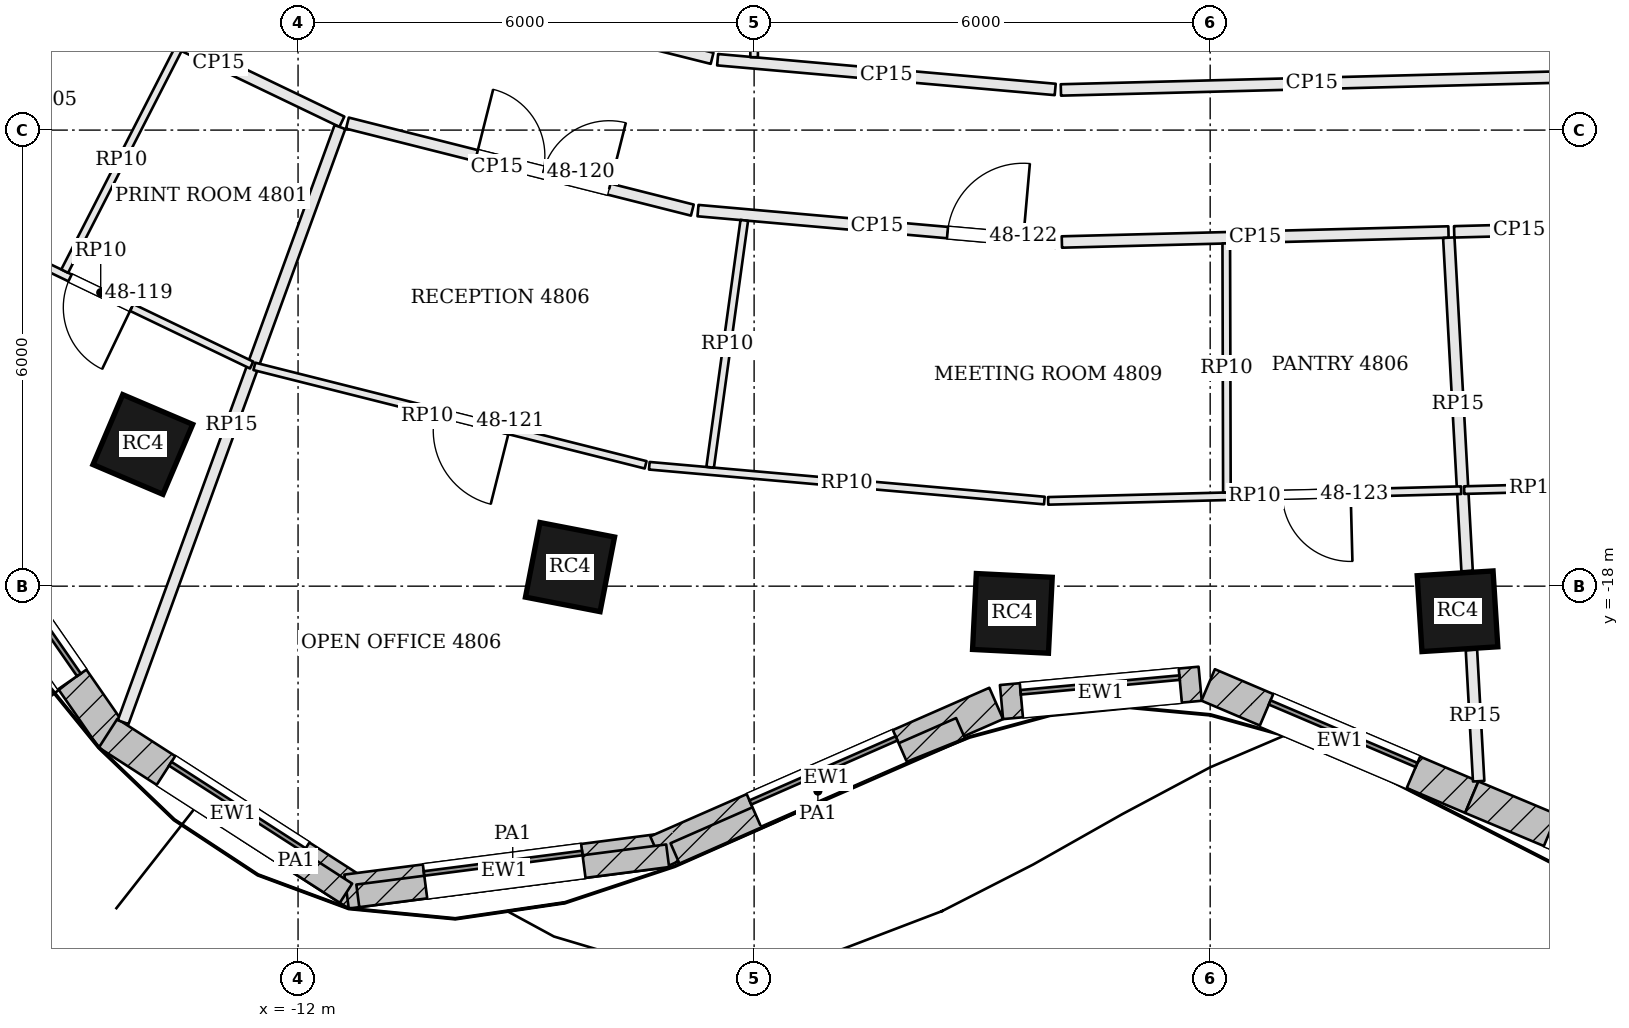
"""IFC4 building model, lengths in metres.
Left out: names, types, materials, properties, quantities, classifications, styles, units other than length and angle.
Written with IfcOpenShell. Run it as: python <this file> out.ifc"""

import sys

from ifc_helpers import new_model, si_unit, direction, frame, frame_2d, origin, origin_2d, place, context, subcontext, project, spatial, rectangle, extrude, element, fill, save


model = new_model("IFC4")
c1 = context("Model", 3, precision=1e-05, world=origin(), true_north=direction((0.0, 1.0)))
c2 = subcontext(c1, "Body", "Model", "MODEL_VIEW")
j1 = project(units=[si_unit("LENGTHUNIT", "METRE"), si_unit("PLANEANGLEUNIT", "RADIAN")], contexts=[c1])
p1 = place(None, origin())
s1 = spatial("IfcSite", under=j1, at=p1, CompositionType="ELEMENT")
p2 = place(p1, origin())
s2 = spatial("IfcBuilding", under=s1, at=p2, CompositionType="ELEMENT")
p3 = place(p2, frame((0.0, 0.0, 197.4)))
s3 = spatial("IfcBuildingStorey", under=s2, at=p3, CompositionType="ELEMENT", Elevation=197.4)
for number, where, z_axis, x_axis in (
    (1, (-14.042, -16.136, 0.0), (0.0, 0.0, 1.0), (0.92, -0.392, 0.0)),
    (2, (-8.422, -17.749, 0.0), (0.0, 0.0, 1.0), (0.982, -0.191, 0.0)),
    (3, (-2.602, -18.358, 0.0), (0.0, 0.0, 1.0), (0.999, -0.05, 0.0)),
    (4, (3.254, -18.33, 0.0), (0.0, 0.0, 1.0), (0.998, 0.063, 0.0)),
):
    element("IfcColumn", number, at=place(p3, frame(where, z_axis=z_axis, x_axis=x_axis)), inside=s3, PredefinedType="COLUMN", context=c2, shape_type="SweptSolid", body=[
        extrude(rectangle(XDim=1.0, YDim=1.0, at=origin_2d()), origin(), (0.0, 0.0, 1.0), 3.9),
    ])
p4 = place(p3, frame((-16.695, -16.737, 0.0), z_axis=(0.0, 0.0, 1.0), x_axis=(0.569652445465, -0.821885692402, 0.0)))
e5 = element("IfcWall", 5, at=p4, inside=s3, PredefinedType="SOLIDWALL", context=c2, shape_type="SweptSolid", body=[
    extrude(rectangle(XDim=3.959, YDim=0.45, at=frame_2d((1.979, 0.0))), origin(), (0.0, 0.0, 1.0), 3.7),
])
p5 = place(p4, frame((0.929, 0.0, 0.9)))
e6 = element("IfcOpeningElement", 6, at=p5, cuts=e5, PredefinedType="OPENING", context=c2, shape_type="SweptSolid", body=[
    extrude(rectangle(XDim=2.1, YDim=2.3, at=frame_2d((1.05, 1.15))), frame((0.0, 0.235, 0.0), z_axis=(0.0, -1.0, 0.0), x_axis=(1.0, 0.0, 0.0)), (0.0, 0.0, 1.0), 0.47),
])
p6 = place(p3, frame((-14.499, -19.935, 0.0), z_axis=(0.0, 0.0, 1.0), x_axis=(0.84080910763, -0.541331732422, 0.0)))
e7 = element("IfcWall", 7, at=p6, inside=s3, PredefinedType="SOLIDWALL", context=c2, shape_type="SweptSolid", body=[
    extrude(rectangle(XDim=3.911, YDim=0.45, at=frame_2d((1.955, 0.0))), origin(), (0.0, 0.0, 1.0), 3.7),
])
p7 = place(p6, frame((0.905, 0.0, 0.9)))
e8 = element("IfcOpeningElement", 8, at=p7, cuts=e7, PredefinedType="OPENING", context=c2, shape_type="SweptSolid", body=[
    extrude(rectangle(XDim=2.1, YDim=2.3, at=frame_2d((1.05, 1.15))), frame((0.0, 0.235, 0.0), z_axis=(0.0, -1.0, 0.0), x_axis=(1.0, 0.0, 0.0)), (0.0, 0.0, 1.0), 0.47),
])
p8 = place(p3, frame((-11.362, -22.018, 0.0), z_axis=(0.0, 0.0, 1.0), x_axis=(0.991724958022, 0.128380713645, 0.0)))
e9 = element("IfcWall", 9, at=p8, inside=s3, PredefinedType="SOLIDWALL", context=c2, shape_type="SweptSolid", body=[
    extrude(rectangle(XDim=4.182, YDim=0.45, at=frame_2d((2.091, 0.0))), origin(), (0.0, 0.0, 1.0), 3.7),
])
p9 = place(p8, frame((1.041, 0.0, 0.9)))
e10 = element("IfcOpeningElement", 10, at=p9, cuts=e9, PredefinedType="OPENING", context=c2, shape_type="SweptSolid", body=[
    extrude(rectangle(XDim=2.1, YDim=2.3, at=frame_2d((1.05, 1.15))), frame((0.0, 0.235, 0.0), z_axis=(0.0, -1.0, 0.0), x_axis=(1.0, 0.0, 0.0)), (0.0, 0.0, 1.0), 0.47),
])
p10 = place(p3, frame((-7.276, -21.498, 0.0), z_axis=(0.0, 0.0, 1.0), x_axis=(0.915872941312, 0.401468249519, 0.0)))
e11 = element("IfcWall", 11, at=p10, inside=s3, PredefinedType="SOLIDWALL", context=c2, shape_type="SweptSolid", body=[
    extrude(rectangle(XDim=4.87, YDim=0.45, at=frame_2d((2.435, 0.0))), origin(), (0.0, 0.0, 1.0), 3.7),
])
p11 = place(p10, frame((1.385, 0.0, 0.9)))
e12 = element("IfcOpeningElement", 12, at=p11, cuts=e11, PredefinedType="OPENING", context=c2, shape_type="SweptSolid", body=[
    extrude(rectangle(XDim=2.1, YDim=2.3, at=frame_2d((1.05, 1.15))), frame((0.0, 0.235, 0.0), z_axis=(0.0, -1.0, 0.0), x_axis=(1.0, 0.0, 0.0)), (0.0, 0.0, 1.0), 0.47),
])
p12 = place(p3, frame((-2.745, -19.525, 0.0), z_axis=(0.0, 0.0, 1.0), x_axis=(0.995768774275, 0.091894222771, 0.0)))
e13 = element("IfcWall", 13, at=p12, inside=s3, PredefinedType="SOLIDWALL", context=c2, shape_type="SweptSolid", body=[
    extrude(rectangle(XDim=2.625, YDim=0.45, at=frame_2d((1.312, 0.0))), origin(), (0.0, 0.0, 1.0), 3.7),
])
p13 = place(p12, frame((0.262, 0.0, 0.9)))
e14 = element("IfcOpeningElement", 14, at=p13, cuts=e13, PredefinedType="OPENING", context=c2, shape_type="SweptSolid", body=[
    extrude(rectangle(XDim=2.1, YDim=2.3, at=frame_2d((1.05, 1.15))), frame((0.0, 0.235, 0.0), z_axis=(0.0, -1.0, 0.0), x_axis=(1.0, 0.0, 0.0)), (0.0, 0.0, 1.0), 0.47),
])
p14 = place(p3, frame((-0.026, -19.299, 0.0), z_axis=(0.0, 0.0, 1.0), x_axis=(0.920040408927, -0.391823488245, 0.0)))
e15 = element("IfcWall", 15, at=p14, inside=s3, PredefinedType="SOLIDWALL", context=c2, shape_type="SweptSolid", body=[
    extrude(rectangle(XDim=3.77, YDim=0.45, at=frame_2d((1.885, 0.0))), origin(), (0.0, 0.0, 1.0), 3.7),
])
p15 = place(p14, frame((0.835, 0.0, 0.9)))
e16 = element("IfcOpeningElement", 16, at=p15, cuts=e15, PredefinedType="OPENING", context=c2, shape_type="SweptSolid", body=[
    extrude(rectangle(XDim=2.1, YDim=2.3, at=frame_2d((1.05, 1.15))), frame((0.0, 0.235, 0.0), z_axis=(0.0, -1.0, 0.0), x_axis=(1.0, 0.0, 0.0)), (0.0, 0.0, 1.0), 0.47),
])
p16 = place(p3, frame((3.441, -20.776, 0.0), z_axis=(0.0, 0.0, 1.0), x_axis=(0.921988121387, -0.387218160758, 0.0)))
e17 = element("IfcWall", 17, at=p16, inside=s3, PredefinedType="SOLIDWALL", context=c2, shape_type="SweptSolid", body=[
    extrude(rectangle(XDim=4.347, YDim=0.45, at=frame_2d((2.173, 0.0))), origin(), (0.0, 0.0, 1.0), 3.7),
])
p17 = place(p16, frame((1.123, 0.0, 0.9)))
e18 = element("IfcOpeningElement", 18, at=p17, cuts=e17, PredefinedType="OPENING", context=c2, shape_type="SweptSolid", body=[
    extrude(rectangle(XDim=2.1, YDim=2.3, at=frame_2d((1.05, 1.15))), frame((0.0, 0.235, 0.0), z_axis=(0.0, -1.0, 0.0), x_axis=(1.0, 0.0, 0.0)), (0.0, 0.0, 1.0), 0.47),
])
p18 = place(p3, frame((-12.68, -21.195, 3.9), z_axis=(0.0, 0.0, 1.0), x_axis=(0.840806975541, -0.541335044018, 0.0)))
e19 = element("IfcWall", 19, at=p18, inside=s3, PredefinedType="PARAPET", context=c2, shape_type="SweptSolid", body=[
    extrude(rectangle(XDim=1.56, YDim=0.3, at=frame_2d((0.78, 0.0))), origin(), (0.0, 0.0, 1.0), 1.1),
])
p19 = place(p3, frame((-11.214, -22.074, 3.9), z_axis=(0.0, 0.0, 1.0), x_axis=(0.991727449614, 0.128361464939, 0.0)))
e20 = element("IfcWall", 20, at=p19, inside=s3, PredefinedType="PARAPET", context=c2, shape_type="SweptSolid", body=[
    extrude(rectangle(XDim=4.11, YDim=0.3, at=frame_2d((2.055, 0.0))), origin(), (0.0, 0.0, 1.0), 1.1),
])
p20 = place(p3, frame((-7.039, -21.519, 3.9), z_axis=(0.0, 0.0, 1.0), x_axis=(0.915890739732, 0.401427643384, 0.0)))
e21 = element("IfcWall", 21, at=p20, inside=s3, PredefinedType="PARAPET", context=c2, shape_type="SweptSolid", body=[
    extrude(rectangle(XDim=4.102, YDim=0.3, at=frame_2d((2.051, 0.0))), origin(), (0.0, 0.0, 1.0), 1.1),
])
p21 = place(p3, frame((-14.664, -10.334, 0.0), z_axis=(0.0, 0.0, 1.0), x_axis=(0.901523057468, -0.432731067585, 0.0)))
e22 = element("IfcWall", 22, at=p21, inside=s3, PredefinedType="PARTITIONING", context=c2, shape_type="SweptSolid", body=[
    extrude(rectangle(XDim=3.595, YDim=0.15, at=frame_2d((1.797, 0.0))), origin(), (0.0, 0.0, 1.0), 3.084),
])
p22 = place(p3, frame((-14.301, -19.789, 0.0), z_axis=(0.0, 0.0, 1.0), x_axis=(0.34224178248, 0.939611921128, 0.0)))
e23 = element("IfcWall", 23, at=p22, inside=s3, PredefinedType="PARTITIONING", context=c2, shape_type="SweptSolid", body=[
    extrude(rectangle(XDim=8.332, YDim=0.15, at=frame_2d((4.166, 0.0))), origin(), (0.0, 0.0, 1.0), 3.084),
])
p23 = place(p3, frame((-11.351, -11.908, 0.0), z_axis=(0.0, 0.0, 1.0), x_axis=(0.969630935796, -0.244572787421, 0.0)))
e24 = element("IfcWall", 24, at=p23, inside=s3, PredefinedType="PARTITIONING", context=c2, shape_type="SweptSolid", body=[
    extrude(rectangle(XDim=4.68, YDim=0.15, at=frame_2d((2.34, 0.0))), origin(), (0.0, 0.0, 1.0), 3.084),
])
p24 = place(p23, frame((1.751, 0.0, 0.0)))
e25 = element("IfcOpeningElement", 25, at=p24, cuts=e24, PredefinedType="OPENING", context=c2, shape_type="SweptSolid", body=[
    extrude(rectangle(XDim=1.8, YDim=2.1, at=frame_2d((0.9, 1.05))), frame((0.0, 0.085, 0.0), z_axis=(0.0, -1.0, 0.0), x_axis=(1.0, 0.0, 0.0)), (0.0, 0.0, 1.0), 0.17),
])
p25 = place(p3, frame((-6.738, -13.059, 0.0), z_axis=(0.0, 0.0, 1.0), x_axis=(0.996143527037, -0.087738666181, 0.0)))
e26 = element("IfcWall", 26, at=p25, inside=s3, PredefinedType="PARTITIONING", context=c2, shape_type="SweptSolid", body=[
    extrude(rectangle(XDim=4.73, YDim=0.15, at=frame_2d((2.365, 0.0))), origin(), (0.0, 0.0, 1.0), 3.084),
])
p26 = place(p25, frame((3.295, 0.0, 0.0)))
e27 = element("IfcOpeningElement", 27, at=p26, cuts=e26, PredefinedType="OPENING", context=c2, shape_type="SweptSolid", body=[
    extrude(rectangle(XDim=1.0, YDim=2.4, at=frame_2d((0.5, 1.2))), frame((0.0, 0.085, 0.0), z_axis=(0.0, -1.0, 0.0), x_axis=(1.0, 0.0, 0.0)), (0.0, 0.0, 1.0), 0.17),
])
p27 = place(p3, frame((-1.951, -13.472, 0.0), z_axis=(0.0, 0.0, 1.0), x_axis=(0.999664235233, 0.025911711565, 0.0)))
e28 = element("IfcWall", 28, at=p27, inside=s3, PredefinedType="PARTITIONING", context=c2, shape_type="SweptSolid", body=[
    extrude(rectangle(XDim=5.088, YDim=0.15, at=frame_2d((2.544, 0.0))), origin(), (0.0, 0.0, 1.0), 3.084),
])
p28 = place(p3, frame((3.532, -20.566, 0.0), z_axis=(0.0, 0.0, 1.0), x_axis=(-0.054930375168, 0.998490187175, 0.0)))
e29 = element("IfcWall", 29, at=p28, inside=s3, PredefinedType="PARTITIONING", context=c2, shape_type="SweptSolid", body=[
    extrude(rectangle(XDim=1.729, YDim=0.15, at=frame_2d((0.865, 0.0))), origin(), (0.0, 0.0, 1.0), 3.084),
])
p29 = place(p3, frame((3.38, -17.801, 0.0), z_axis=(0.0, 0.0, 1.0), x_axis=(-0.054860476936, 0.998494030062, 0.0)))
e30 = element("IfcWall", 30, at=p29, inside=s3, PredefinedType="PARTITIONING", context=c2, shape_type="SweptSolid", body=[
    extrude(rectangle(XDim=4.392, YDim=0.15, at=frame_2d((2.196, 0.0))), origin(), (0.0, 0.0, 1.0), 3.084),
])
p30 = place(p3, frame((3.21, -13.339, 0.0), z_axis=(0.0, 0.0, 1.0), x_axis=(0.999662941738, 0.025961566124, 0.0)))
e31 = element("IfcWall", 31, at=p30, inside=s3, PredefinedType="PARTITIONING", context=c2, shape_type="SweptSolid", body=[
    extrude(rectangle(XDim=1.711, YDim=0.15, at=frame_2d((0.856, 0.0))), origin(), (0.0, 0.0, 1.0), 3.084),
])
p31 = place(p3, frame((4.645, -11.301, 0.0), z_axis=(0.0, 0.0, 1.0), x_axis=(-0.9996648469, -0.02588810291, 0.0)))
e32 = element("IfcWall", 32, at=p31, inside=s3, PredefinedType="PARTITIONING", context=c2, shape_type="SweptSolid", body=[
    extrude(rectangle(XDim=6.611, YDim=0.15, at=frame_2d((3.305, 0.0))), origin(), (0.0, 0.0, 1.0), 3.084),
])
p32 = place(p3, frame((-2.039, -11.465, 0.0), z_axis=(0.0, 0.0, 1.0), x_axis=(-0.996139855484, 0.087780341286, 0.0)))
e33 = element("IfcWall", 33, at=p32, inside=s3, PredefinedType="PARTITIONING", context=c2, shape_type="SweptSolid", body=[
    extrude(rectangle(XDim=4.458, YDim=0.15, at=frame_2d((2.229, 0.0))), origin(), (0.0, 0.0, 1.0), 3.084),
])
p33 = place(p3, frame((-6.553, -11.056, 0.0), z_axis=(0.0, 0.0, 1.0), x_axis=(-0.970004917182, 0.243085294995, 0.0)))
e34 = element("IfcWall", 34, at=p33, inside=s3, PredefinedType="PARTITIONING", context=c2, shape_type="SweptSolid", body=[
    extrude(rectangle(XDim=4.284, YDim=0.15, at=frame_2d((2.142, 0.0))), origin(), (0.0, 0.0, 1.0), 3.084),
])
p34 = place(p3, frame((-12.611, -15.091, 0.0), z_axis=(0.0, 0.0, 1.0), x_axis=(-0.901527382061, 0.432722057901, 0.0)))
e35 = element("IfcWall", 35, at=p34, inside=s3, PredefinedType="PARTITIONING", context=c2, shape_type="SweptSolid", body=[
    extrude(rectangle(XDim=4.405, YDim=0.1, at=frame_2d((2.202, 0.0))), origin(), (0.0, 0.0, 1.0), 3.084),
])
p35 = place(p34, frame((1.75, 0.0, 0.0)))
e36 = element("IfcOpeningElement", 36, at=p35, cuts=e35, PredefinedType="OPENING", context=c2, shape_type="SweptSolid", body=[
    extrude(rectangle(XDim=0.9, YDim=2.1, at=frame_2d((0.45, 1.05))), frame((0.0, 0.06, 0.0), z_axis=(0.0, -1.0, 0.0), x_axis=(1.0, 0.0, 0.0)), (0.0, 0.0, 1.0), 0.12),
])
p36 = place(p3, frame((-13.578, -10.939, 0.0), z_axis=(0.0, 0.0, 1.0), x_axis=(-0.455540357247, -0.890215132942, 0.0)))
e37 = element("IfcWall", 37, at=p36, inside=s3, PredefinedType="PARTITIONING", context=c2, shape_type="SweptSolid", body=[
    extrude(rectangle(XDim=3.276, YDim=0.1, at=frame_2d((1.638, 0.0))), origin(), (0.0, 0.0, 1.0), 3.084),
])
p37 = place(p3, frame((3.302, -16.737, 0.0), z_axis=(0.0, 0.0, 1.0), x_axis=(-0.999665233763, -0.025873159948, 0.0)))
e38 = element("IfcWall", 38, at=p37, inside=s3, PredefinedType="PARTITIONING", context=c2, shape_type="SweptSolid", body=[
    extrude(rectangle(XDim=5.435, YDim=0.1, at=frame_2d((2.718, 0.0))), origin(), (0.0, 0.0, 1.0), 3.084),
])
p38 = place(p37, frame((1.454, 0.0, 0.0)))
e39 = element("IfcOpeningElement", 39, at=p38, cuts=e38, PredefinedType="OPENING", context=c2, shape_type="SweptSolid", body=[
    extrude(rectangle(XDim=0.9, YDim=2.1, at=frame_2d((0.45, 1.05))), frame((0.0, 0.06, 0.0), z_axis=(0.0, -1.0, 0.0), x_axis=(1.0, 0.0, 0.0)), (0.0, 0.0, 1.0), 0.12),
])
p39 = place(p3, frame((-2.181, -16.874, 0.0), z_axis=(0.0, 0.0, 1.0), x_axis=(-0.996143934904, 0.087734035321, 0.0)))
e40 = element("IfcWall", 40, at=p39, inside=s3, PredefinedType="PARTITIONING", context=c2, shape_type="SweptSolid", body=[
    extrude(rectangle(XDim=5.218, YDim=0.1, at=frame_2d((2.609, 0.0))), origin(), (0.0, 0.0, 1.0), 3.084),
])
p40 = place(p3, frame((-7.427, -16.404, 0.0), z_axis=(0.0, 0.0, 1.0), x_axis=(-0.969770679243, 0.244018092937, 0.0)))
e41 = element("IfcWall", 41, at=p40, inside=s3, PredefinedType="PARTITIONING", context=c2, shape_type="SweptSolid", body=[
    extrude(rectangle(XDim=5.308, YDim=0.1, at=frame_2d((2.654, 0.0))), origin(), (0.0, 0.0, 1.0), 3.084),
])
p41 = place(p40, frame((1.85, 0.0, 0.0)))
e42 = element("IfcOpeningElement", 42, at=p41, cuts=e41, PredefinedType="OPENING", context=c2, shape_type="SweptSolid", body=[
    extrude(rectangle(XDim=1.0, YDim=2.1, at=frame_2d((0.5, 1.05))), frame((0.0, 0.06, 0.0), z_axis=(0.0, -1.0, 0.0), x_axis=(1.0, 0.0, 0.0)), (0.0, 0.0, 1.0), 0.12),
])
p42 = place(p3, frame((-6.129, -13.188, 0.0), z_axis=(0.0, 0.0, 1.0), x_axis=(-0.136990097494, -0.990572416933, 0.0)))
e43 = element("IfcWall", 43, at=p42, inside=s3, PredefinedType="PARTITIONING", context=c2, shape_type="SweptSolid", body=[
    extrude(rectangle(XDim=3.279, YDim=0.1, at=frame_2d((1.64, 0.0))), origin(), (0.0, 0.0, 1.0), 3.084),
])
p43 = place(p3, frame((0.212, -13.491, 0.0), z_axis=(0.0, 0.0, 1.0), x_axis=(0.002533901539, -0.999996789666, 0.0)))
e44 = element("IfcWall", 44, at=p43, inside=s3, PredefinedType="PARTITIONING", context=c2, shape_type="SweptSolid", body=[
    extrude(rectangle(XDim=3.276, YDim=0.1, at=frame_2d((1.638, 0.0))), origin(), (0.0, 0.0, 1.0), 3.084),
])
p44 = place(p3, frame((5.214, -16.688, 0.0), z_axis=(0.0, 0.0, 1.0), x_axis=(-0.99966341664, -0.025943273332, 0.0)))
e45 = element("IfcWall", 45, at=p44, inside=s3, PredefinedType="PARTITIONING", context=c2, shape_type="SweptSolid", body=[
    extrude(rectangle(XDim=1.873, YDim=0.1, at=frame_2d((0.937, 0.0))), origin(), (0.0, 0.0, 1.0), 3.084),
])
p45 = place(p3, frame((-6.0, -11.041, 0.0), z_axis=(0.0, 0.0, 1.0), x_axis=(0.0, 1.0, 0.0)))
e46 = element("IfcWall", 46, at=p45, inside=s3, PredefinedType="PARTITIONING", context=c2, shape_type="SweptSolid", body=[
    extrude(rectangle(XDim=5.966, YDim=0.1, at=frame_2d((2.983, 0.0))), origin(), (0.0, 0.0, 1.0), 3.084),
])
p46 = place(p5, origin())
e47 = element("IfcWindow", 47, at=p46, inside=s3, PartitioningType="SINGLE_PANEL", PredefinedType="WINDOW", context=c2, shape_type="SweptSolid", body=[
    extrude(rectangle(XDim=2.1, YDim=2.3, at=frame_2d((1.05, 1.15))), frame((0.0, 0.135, 0.0), z_axis=(0.0, -1.0, 0.0), x_axis=(1.0, 0.0, 0.0)), (0.0, 0.0, 1.0), 0.06),
])
fill(e6, e47)
p47 = place(p7, origin())
e48 = element("IfcWindow", 48, at=p47, inside=s3, PartitioningType="SINGLE_PANEL", PredefinedType="WINDOW", context=c2, shape_type="SweptSolid", body=[
    extrude(rectangle(XDim=2.1, YDim=2.3, at=frame_2d((1.05, 1.15))), frame((0.0, 0.135, 0.0), z_axis=(0.0, -1.0, 0.0), x_axis=(1.0, 0.0, 0.0)), (0.0, 0.0, 1.0), 0.06),
])
fill(e8, e48)
p48 = place(p9, origin())
e49 = element("IfcWindow", 49, at=p48, inside=s3, PartitioningType="SINGLE_PANEL", PredefinedType="WINDOW", context=c2, shape_type="SweptSolid", body=[
    extrude(rectangle(XDim=2.1, YDim=2.3, at=frame_2d((1.05, 1.15))), frame((0.0, 0.135, 0.0), z_axis=(0.0, -1.0, 0.0), x_axis=(1.0, 0.0, 0.0)), (0.0, 0.0, 1.0), 0.06),
])
fill(e10, e49)
p49 = place(p11, origin())
e50 = element("IfcWindow", 50, at=p49, inside=s3, PartitioningType="SINGLE_PANEL", PredefinedType="WINDOW", context=c2, shape_type="SweptSolid", body=[
    extrude(rectangle(XDim=2.1, YDim=2.3, at=frame_2d((1.05, 1.15))), frame((0.0, 0.135, 0.0), z_axis=(0.0, -1.0, 0.0), x_axis=(1.0, 0.0, 0.0)), (0.0, 0.0, 1.0), 0.06),
])
fill(e12, e50)
p50 = place(p13, origin())
e51 = element("IfcWindow", 51, at=p50, inside=s3, PartitioningType="SINGLE_PANEL", PredefinedType="WINDOW", context=c2, shape_type="SweptSolid", body=[
    extrude(rectangle(XDim=2.1, YDim=2.3, at=frame_2d((1.05, 1.15))), frame((0.0, 0.135, 0.0), z_axis=(0.0, -1.0, 0.0), x_axis=(1.0, 0.0, 0.0)), (0.0, 0.0, 1.0), 0.06),
])
fill(e14, e51)
p51 = place(p15, origin())
e52 = element("IfcWindow", 52, at=p51, inside=s3, PartitioningType="SINGLE_PANEL", PredefinedType="WINDOW", context=c2, shape_type="SweptSolid", body=[
    extrude(rectangle(XDim=2.1, YDim=2.3, at=frame_2d((1.05, 1.15))), frame((0.0, 0.135, 0.0), z_axis=(0.0, -1.0, 0.0), x_axis=(1.0, 0.0, 0.0)), (0.0, 0.0, 1.0), 0.06),
])
fill(e16, e52)
p52 = place(p35, origin())
e53 = element("IfcDoor", 53, at=p52, inside=s3, OperationType="SINGLE_SWING_LEFT", PredefinedType="DOOR", context=c2, shape_type="SweptSolid", body=[
    extrude(rectangle(XDim=0.9, YDim=2.1, at=frame_2d((0.45, 1.05))), frame((0.0, 0.025, 0.0), z_axis=(0.0, -1.0, 0.0), x_axis=(1.0, 0.0, 0.0)), (0.0, 0.0, 1.0), 0.05),
])
fill(e36, e53)
p53 = place(p24, origin())
e54 = element("IfcDoor", 54, at=p53, inside=s3, OperationType="DOUBLE_DOOR_SINGLE_SWING", PredefinedType="DOOR", context=c2, shape_type="SweptSolid", body=[
    extrude(rectangle(XDim=1.8, YDim=2.1, at=frame_2d((0.9, 1.05))), frame((0.0, 0.025, 0.0), z_axis=(0.0, -1.0, 0.0), x_axis=(1.0, 0.0, 0.0)), (0.0, 0.0, 1.0), 0.05),
])
fill(e25, e54)
p54 = place(p41, origin())
e55 = element("IfcDoor", 55, at=p54, inside=s3, OperationType="SINGLE_SWING_LEFT", PredefinedType="DOOR", context=c2, shape_type="SweptSolid", body=[
    extrude(rectangle(XDim=1.0, YDim=2.1, at=frame_2d((0.5, 1.05))), frame((0.0, 0.025, 0.0), z_axis=(0.0, -1.0, 0.0), x_axis=(1.0, 0.0, 0.0)), (0.0, 0.0, 1.0), 0.05),
])
fill(e42, e55)
p55 = place(p26, origin())
e56 = element("IfcDoor", 56, at=p55, inside=s3, OperationType="SINGLE_SWING_RIGHT", PredefinedType="DOOR", context=c2, shape_type="SweptSolid", body=[
    extrude(rectangle(XDim=1.0, YDim=2.4, at=frame_2d((0.5, 1.2))), frame((0.0, 0.025, 0.0), z_axis=(0.0, -1.0, 0.0), x_axis=(1.0, 0.0, 0.0)), (0.0, 0.0, 1.0), 0.05),
])
fill(e27, e56)
p56 = place(p38, origin())
e57 = element("IfcDoor", 57, at=p56, inside=s3, OperationType="SINGLE_SWING_LEFT", PredefinedType="DOOR", context=c2, shape_type="SweptSolid", body=[
    extrude(rectangle(XDim=0.9, YDim=2.1, at=frame_2d((0.45, 1.05))), frame((0.0, 0.025, 0.0), z_axis=(0.0, -1.0, 0.0), x_axis=(1.0, 0.0, 0.0)), (0.0, 0.0, 1.0), 0.05),
])
fill(e39, e57)
save(model, sys.argv[1])
